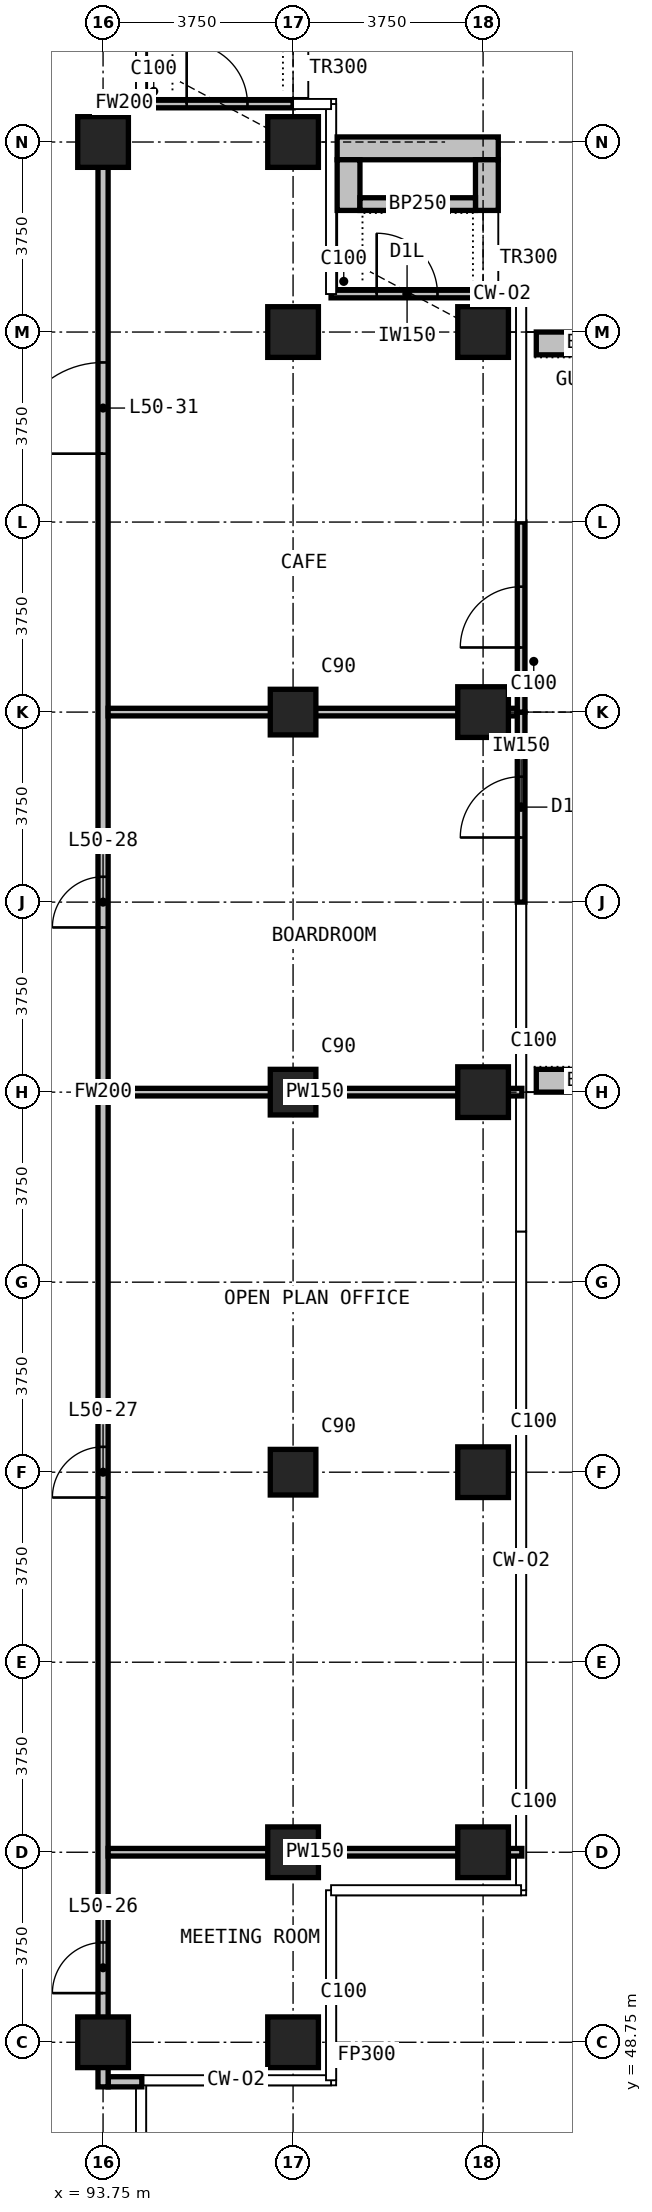
"""IFC4 building model, lengths in metres.
Left out: names, types, materials, properties, quantities, classifications, styles, units other than length and angle.
Written with IfcOpenShell. Run it as: python <this file> out.ifc"""

import sys

from ifc_helpers import new_model, si_unit, direction, frame, frame_2d, origin, origin_2d, place, context, subcontext, project, spatial, rectangle, extrude, element, fill, save


model = new_model("IFC4")
c1 = context("Model", 3, precision=1e-05, world=origin(), true_north=direction((0.0, 1.0)))
c2 = subcontext(c1, "Body", "Model", "MODEL_VIEW")
j1 = project(units=[si_unit("LENGTHUNIT", "METRE"), si_unit("PLANEANGLEUNIT", "RADIAN")], contexts=[c1])
p1 = place(None, origin())
s1 = spatial("IfcSite", under=j1, at=p1, CompositionType="ELEMENT")
p2 = place(p1, origin())
s2 = spatial("IfcBuilding", under=s1, at=p2, CompositionType="ELEMENT")
p3 = place(p2, frame((0.0, 0.0, 195.9)))
s3 = spatial("IfcBuildingStorey", under=s2, at=p3, CompositionType="ELEMENT", Elevation=195.9)
for number, where, z_axis, x_axis in (
    (1, (93.75, 48.75, 0.0), (0.0, 0.0, 1.0), (1.0, 0.0, 0.0)),
    (2, (93.75, 86.25, 0.0), (0.0, 0.0, 1.0), (1.0, 0.0, 0.0)),
    (3, (97.5, 48.75, 0.0), (0.0, 0.0, 1.0), (1.0, 0.0, 0.0)),
    (4, (97.5, 52.5, 0.0), (0.0, 0.0, 1.0), (1.0, 0.0, 0.0)),
):
    element("IfcColumn", number, at=place(p3, frame(where, z_axis=z_axis, x_axis=x_axis)), inside=s3, PredefinedType="COLUMN", context=c2, shape_type="SweptSolid", body=[
        extrude(rectangle(XDim=1.0, YDim=1.0, at=origin_2d()), origin(), (0.0, 0.0, 1.0), 3.6),
    ])
for number, where, z_axis, x_axis in (
    (5, (97.5, 60.0, 0.0), (0.0, 0.0, 1.0), (1.0, 0.0, 0.0)),
    (6, (97.5, 67.5, 0.0), (0.0, 0.0, 1.0), (1.0, 0.0, 0.0)),
    (7, (97.5, 75.0, 0.0), (0.0, 0.0, 1.0), (1.0, 0.0, 0.0)),
):
    element("IfcColumn", number, at=place(p3, frame(where, z_axis=z_axis, x_axis=x_axis)), inside=s3, PredefinedType="COLUMN", context=c2, shape_type="SweptSolid", body=[
        extrude(rectangle(XDim=0.9, YDim=0.9, at=origin_2d()), origin(), (0.0, 0.0, 1.0), 3.6),
    ])
for number, where, z_axis, x_axis in (
    (8, (97.5, 82.5, 0.0), (0.0, 0.0, 1.0), (1.0, 0.0, 0.0)),
    (9, (97.5, 86.25, 0.0), (0.0, 0.0, 1.0), (1.0, 0.0, 0.0)),
    (10, (101.25, 52.5, 0.0), (0.0, 0.0, 1.0), (1.0, 0.0, 0.0)),
    (11, (101.25, 60.0, 0.0), (0.0, 0.0, 1.0), (1.0, 0.0, 0.0)),
    (12, (101.25, 67.5, 0.0), (0.0, 0.0, 1.0), (1.0, 0.0, 0.0)),
    (13, (101.25, 75.0, 0.0), (0.0, 0.0, 1.0), (1.0, 0.0, 0.0)),
    (14, (101.25, 82.5, 0.0), (0.0, 0.0, 1.0), (1.0, 0.0, 0.0)),
):
    element("IfcColumn", number, at=place(p3, frame(where, z_axis=z_axis, x_axis=x_axis)), inside=s3, PredefinedType="COLUMN", context=c2, shape_type="SweptSolid", body=[
        extrude(rectangle(XDim=1.0, YDim=1.0, at=origin_2d()), origin(), (0.0, 0.0, 1.0), 3.6),
    ])
p4 = place(p3, frame((102.0, 71.25, 0.0), z_axis=(0.0, 0.0, 1.0), x_axis=(0.0, 1.0, 0.0)))
e15 = element("IfcWall", 15, at=p4, inside=s3, PredefinedType="SOLIDWALL", context=c2, shape_type="SweptSolid", body=[
    extrude(rectangle(XDim=3.75, YDim=0.15, at=frame_2d((1.875, 0.0))), origin(), (0.0, 0.0, 1.0), 3.3),
])
p5 = place(p4, frame((1.275, 0.0, 0.0)))
e16 = element("IfcOpeningElement", 16, at=p5, cuts=e15, PredefinedType="OPENING", context=c2, shape_type="SweptSolid", body=[
    extrude(rectangle(XDim=1.2, YDim=2.4, at=frame_2d((0.6, 1.2))), frame((0.0, 0.085, 0.0), z_axis=(0.0, -1.0, 0.0), x_axis=(1.0, 0.0, 0.0)), (0.0, 0.0, 1.0), 0.17),
])
p6 = place(p3, frame((102.0, 75.0, 0.0), z_axis=(0.0, 0.0, 1.0), x_axis=(0.0, 1.0, 0.0)))
e17 = element("IfcWall", 17, at=p6, inside=s3, PredefinedType="SOLIDWALL", context=c2, shape_type="SweptSolid", body=[
    extrude(rectangle(XDim=3.75, YDim=0.15, at=frame_2d((1.875, 0.0))), origin(), (0.0, 0.0, 1.0), 3.3),
])
p7 = place(p6, frame((1.275, 0.0, 0.0)))
e18 = element("IfcOpeningElement", 18, at=p7, cuts=e17, PredefinedType="OPENING", context=c2, shape_type="SweptSolid", body=[
    extrude(rectangle(XDim=1.2, YDim=2.4, at=frame_2d((0.6, 1.2))), frame((0.0, 0.085, 0.0), z_axis=(0.0, -1.0, 0.0), x_axis=(1.0, 0.0, 0.0)), (0.0, 0.0, 1.0), 0.17),
])
p8 = place(p3, frame((98.25, 83.25, 0.0), z_axis=(0.0, 0.0, 1.0), x_axis=(1.0, 0.0, 0.0)))
e19 = element("IfcWall", 19, at=p8, inside=s3, PredefinedType="SOLIDWALL", context=c2, shape_type="SweptSolid", body=[
    extrude(rectangle(XDim=3.0, YDim=0.15, at=frame_2d((1.5, 0.0))), origin(), (0.0, 0.0, 1.0), 3.3),
])
p9 = place(p8, frame((0.9, 0.0, 0.0)))
e20 = element("IfcOpeningElement", 20, at=p9, cuts=e19, PredefinedType="OPENING", context=c2, shape_type="SweptSolid", body=[
    extrude(rectangle(XDim=1.2, YDim=2.0, at=frame_2d((0.6, 1.0))), frame((0.0, 0.085, 0.0), z_axis=(0.0, -1.0, 0.0), x_axis=(1.0, 0.0, 0.0)), (0.0, 0.0, 1.0), 0.17),
])
p10 = place(p3, frame((94.5, 87.0, 0.0), z_axis=(0.0, 0.0, 1.0), x_axis=(1.0, 0.0, 0.0)))
e21 = element("IfcWall", 21, at=p10, inside=s3, PredefinedType="SOLIDWALL", context=c2, shape_type="SweptSolid", body=[
    extrude(rectangle(XDim=3.0, YDim=0.15, at=frame_2d((1.5, 0.0))), origin(), (0.0, 0.0, 1.0), 3.3),
])
p11 = place(p10, frame((0.9, 0.0, 0.0)))
e22 = element("IfcOpeningElement", 22, at=p11, cuts=e21, PredefinedType="OPENING", context=c2, shape_type="SweptSolid", body=[
    extrude(rectangle(XDim=1.2, YDim=2.0, at=frame_2d((0.6, 1.0))), frame((0.0, 0.085, 0.0), z_axis=(0.0, -1.0, 0.0), x_axis=(1.0, 0.0, 0.0)), (0.0, 0.0, 1.0), 0.17),
])
for number, where, z_axis, x_axis in (
    (23, (102.3, 67.725, 0.0), (0.0, 0.0, 1.0), (1.0, 0.0, 0.0)),
    (24, (102.3, 82.275, 0.0), (0.0, 0.0, 1.0), (1.0, 0.0, 0.0)),
):
    element("IfcWall", number, at=place(p3, frame(where, z_axis=z_axis, x_axis=x_axis)), inside=s3, PredefinedType="USERDEFINED", context=c2, shape_type="SweptSolid", body=[
        extrude(rectangle(XDim=2.35, YDim=0.45, at=frame_2d((1.175, 0.0))), origin(), (0.0, 0.0, 1.0), 1.1),
    ])
p12 = place(p3, frame((98.37, 86.125, 0.0), z_axis=(0.0, 0.0, 1.0), x_axis=(1.0, 0.0, 0.0)))
e25 = element("IfcWall", 25, at=p12, inside=s3, PredefinedType="USERDEFINED", context=c2, shape_type="SweptSolid", body=[
    extrude(rectangle(XDim=3.18, YDim=0.45, at=frame_2d((1.59, 0.0))), origin(), (0.0, 0.0, 1.0), 1.1),
])
for number, where, z_axis, x_axis in (
    (26, (98.595, 84.9, 0.0), (0.0, 0.0, 1.0), (0.0, 1.0, 0.0)),
    (27, (101.325, 84.9, 0.0), (0.0, 0.0, 1.0), (0.0, 1.0, 0.0)),
):
    element("IfcWall", number, at=place(p3, frame(where, z_axis=z_axis, x_axis=x_axis)), inside=s3, PredefinedType="USERDEFINED", context=c2, shape_type="SweptSolid", body=[
        extrude(rectangle(XDim=1.0, YDim=0.45, at=frame_2d((0.5, 0.0))), origin(), (0.0, 0.0, 1.0), 1.1),
    ])
p13 = place(p3, frame((98.82, 85.025, 0.0), z_axis=(0.0, 0.0, 1.0), x_axis=(1.0, 0.0, 0.0)))
e28 = element("IfcWall", 28, at=p13, inside=s3, PredefinedType="USERDEFINED", context=c2, shape_type="SweptSolid", body=[
    extrude(rectangle(XDim=2.28, YDim=0.25, at=frame_2d((1.14, 0.0))), origin(), (0.0, 0.0, 1.0), 1.0),
])
p14 = place(p3, frame((93.85, 47.97, 0.0), z_axis=(0.0, 0.0, 1.0), x_axis=(1.0, 0.0, 0.0)))
e29 = element("IfcWall", 29, at=p14, inside=s3, PredefinedType="PARTITIONING", context=c2, shape_type="SweptSolid", body=[
    extrude(rectangle(XDim=0.665, YDim=0.2, at=frame_2d((0.333, 0.0))), origin(), (0.0, 0.0, 1.0), 3.3),
])
p15 = place(p3, frame((93.85, 87.03, 0.0), z_axis=(0.0, 0.0, 1.0), x_axis=(1.0, 0.0, 0.0)))
e30 = element("IfcWall", 30, at=p15, inside=s3, PredefinedType="PARTITIONING", context=c2, shape_type="SweptSolid", body=[
    extrude(rectangle(XDim=0.64, YDim=0.2, at=frame_2d((0.32, 0.0))), origin(), (0.0, 0.0, 1.0), 3.3),
])
p16 = place(p3, frame((93.75, 47.87, 0.0), z_axis=(0.0, 0.0, 1.0), x_axis=(0.0, 1.0, 0.0)))
e31 = element("IfcWall", 31, at=p16, inside=s3, PredefinedType="PARTITIONING", context=c2, shape_type="SweptSolid", body=[
    extrude(rectangle(XDim=39.26, YDim=0.2, at=frame_2d((19.63, 0.0))), origin(), (0.0, 0.0, 1.0), 3.3),
])
p17 = place(p16, frame((1.85, 0.0, 0.0)))
e32 = element("IfcOpeningElement", 32, at=p17, cuts=e31, PredefinedType="OPENING", context=c2, shape_type="SweptSolid", body=[
    extrude(rectangle(XDim=1.0, YDim=2.2, at=frame_2d((0.5, 1.1))), frame((0.0, 0.11, 0.0), z_axis=(0.0, -1.0, 0.0), x_axis=(1.0, 0.0, 0.0)), (0.0, 0.0, 1.0), 0.22),
])
p18 = place(p16, frame((11.63, 0.0, 0.0)))
e33 = element("IfcOpeningElement", 33, at=p18, cuts=e31, PredefinedType="OPENING", context=c2, shape_type="SweptSolid", body=[
    extrude(rectangle(XDim=1.0, YDim=2.2, at=frame_2d((0.5, 1.1))), frame((0.0, 0.11, 0.0), z_axis=(0.0, -1.0, 0.0), x_axis=(1.0, 0.0, 0.0)), (0.0, 0.0, 1.0), 0.22),
])
p19 = place(p16, frame((22.88, 0.0, 0.0)))
e34 = element("IfcOpeningElement", 34, at=p19, cuts=e31, PredefinedType="OPENING", context=c2, shape_type="SweptSolid", body=[
    extrude(rectangle(XDim=1.0, YDim=2.2, at=frame_2d((0.5, 1.1))), frame((0.0, 0.11, 0.0), z_axis=(0.0, -1.0, 0.0), x_axis=(1.0, 0.0, 0.0)), (0.0, 0.0, 1.0), 0.22),
])
p20 = place(p16, frame((32.23, 0.0, 0.0)))
e35 = element("IfcOpeningElement", 35, at=p20, cuts=e31, PredefinedType="OPENING", context=c2, shape_type="SweptSolid", body=[
    extrude(rectangle(XDim=1.8, YDim=2.2, at=frame_2d((0.9, 1.1))), frame((0.0, 0.11, 0.0), z_axis=(0.0, -1.0, 0.0), x_axis=(1.0, 0.0, 0.0)), (0.0, 0.0, 1.0), 0.22),
])
for number, where, z_axis, x_axis in (
    (36, (93.85, 52.5, 0.0), (0.0, 0.0, 1.0), (1.0, 0.0, 0.0)),
    (37, (93.85, 67.5, 0.0), (0.0, 0.0, 1.0), (1.0, 0.0, 0.0)),
):
    element("IfcWall", number, at=place(p3, frame(where, z_axis=z_axis, x_axis=x_axis)), inside=s3, PredefinedType="PARTITIONING", context=c2, shape_type="SweptSolid", body=[
        extrude(rectangle(XDim=8.165, YDim=0.15, at=frame_2d((4.083, 0.0))), origin(), (0.0, 0.0, 1.0), 3.3),
    ])
p21 = place(p3, frame((93.85, 75.0, 0.0), z_axis=(0.0, 0.0, 1.0), x_axis=(1.0, 0.0, 0.0)))
e38 = element("IfcWall", 38, at=p21, inside=s3, PredefinedType="PARTITIONING", context=c2, shape_type="SweptSolid", body=[
    extrude(rectangle(XDim=8.065, YDim=0.15, at=frame_2d((4.032, 0.0))), origin(), (0.0, 0.0, 1.0), 3.3),
])
p22 = place(p5, origin())
e39 = element("IfcDoor", 39, at=p22, inside=s3, OperationType="SINGLE_SWING_LEFT", PredefinedType="DOOR", context=c2, shape_type="SweptSolid", body=[
    extrude(rectangle(XDim=1.2, YDim=2.4, at=frame_2d((0.6, 1.2))), frame((0.0, 0.025, 0.0), z_axis=(0.0, -1.0, 0.0), x_axis=(1.0, 0.0, 0.0)), (0.0, 0.0, 1.0), 0.05),
])
fill(e16, e39)
p23 = place(p7, origin())
e40 = element("IfcDoor", 40, at=p23, inside=s3, OperationType="SINGLE_SWING_LEFT", PredefinedType="DOOR", context=c2, shape_type="SweptSolid", body=[
    extrude(rectangle(XDim=1.2, YDim=2.4, at=frame_2d((0.6, 1.2))), frame((0.0, 0.025, 0.0), z_axis=(0.0, -1.0, 0.0), x_axis=(1.0, 0.0, 0.0)), (0.0, 0.0, 1.0), 0.05),
])
fill(e18, e40)
p24 = place(p9, origin())
e41 = element("IfcDoor", 41, at=p24, inside=s3, OperationType="SINGLE_SWING_LEFT", PredefinedType="DOOR", context=c2, shape_type="SweptSolid", body=[
    extrude(rectangle(XDim=1.2, YDim=2.0, at=frame_2d((0.6, 1.0))), frame((0.0, 0.025, 0.0), z_axis=(0.0, -1.0, 0.0), x_axis=(1.0, 0.0, 0.0)), (0.0, 0.0, 1.0), 0.05),
])
fill(e20, e41)
p25 = place(p11, origin())
e42 = element("IfcDoor", 42, at=p25, inside=s3, OperationType="SINGLE_SWING_LEFT", PredefinedType="DOOR", context=c2, shape_type="SweptSolid", body=[
    extrude(rectangle(XDim=1.2, YDim=2.0, at=frame_2d((0.6, 1.0))), frame((0.0, 0.025, 0.0), z_axis=(0.0, -1.0, 0.0), x_axis=(1.0, 0.0, 0.0)), (0.0, 0.0, 1.0), 0.05),
])
fill(e22, e42)
p26 = place(p17, origin())
e43 = element("IfcDoor", 43, at=p26, inside=s3, OperationType="SINGLE_SWING_LEFT", PredefinedType="DOOR", context=c2, shape_type="SweptSolid", body=[
    extrude(rectangle(XDim=1.0, YDim=2.2, at=frame_2d((0.5, 1.1))), frame((0.0, 0.025, 0.0), z_axis=(0.0, -1.0, 0.0), x_axis=(1.0, 0.0, 0.0)), (0.0, 0.0, 1.0), 0.05),
])
fill(e32, e43)
p27 = place(p18, origin())
e44 = element("IfcDoor", 44, at=p27, inside=s3, OperationType="SINGLE_SWING_LEFT", PredefinedType="DOOR", context=c2, shape_type="SweptSolid", body=[
    extrude(rectangle(XDim=1.0, YDim=2.2, at=frame_2d((0.5, 1.1))), frame((0.0, 0.025, 0.0), z_axis=(0.0, -1.0, 0.0), x_axis=(1.0, 0.0, 0.0)), (0.0, 0.0, 1.0), 0.05),
])
fill(e33, e44)
p28 = place(p19, origin())
e45 = element("IfcDoor", 45, at=p28, inside=s3, OperationType="SINGLE_SWING_LEFT", PredefinedType="DOOR", context=c2, shape_type="SweptSolid", body=[
    extrude(rectangle(XDim=1.0, YDim=2.2, at=frame_2d((0.5, 1.1))), frame((0.0, 0.025, 0.0), z_axis=(0.0, -1.0, 0.0), x_axis=(1.0, 0.0, 0.0)), (0.0, 0.0, 1.0), 0.05),
])
fill(e34, e45)
p29 = place(p20, origin())
e46 = element("IfcDoor", 46, at=p29, inside=s3, OperationType="DOUBLE_DOOR_SINGLE_SWING", PredefinedType="DOOR", context=c2, shape_type="SweptSolid", body=[
    extrude(rectangle(XDim=1.8, YDim=2.2, at=frame_2d((0.9, 1.1))), frame((0.0, 0.025, 0.0), z_axis=(0.0, -1.0, 0.0), x_axis=(1.0, 0.0, 0.0)), (0.0, 0.0, 1.0), 0.05),
])
fill(e35, e46)
save(model, sys.argv[1])
